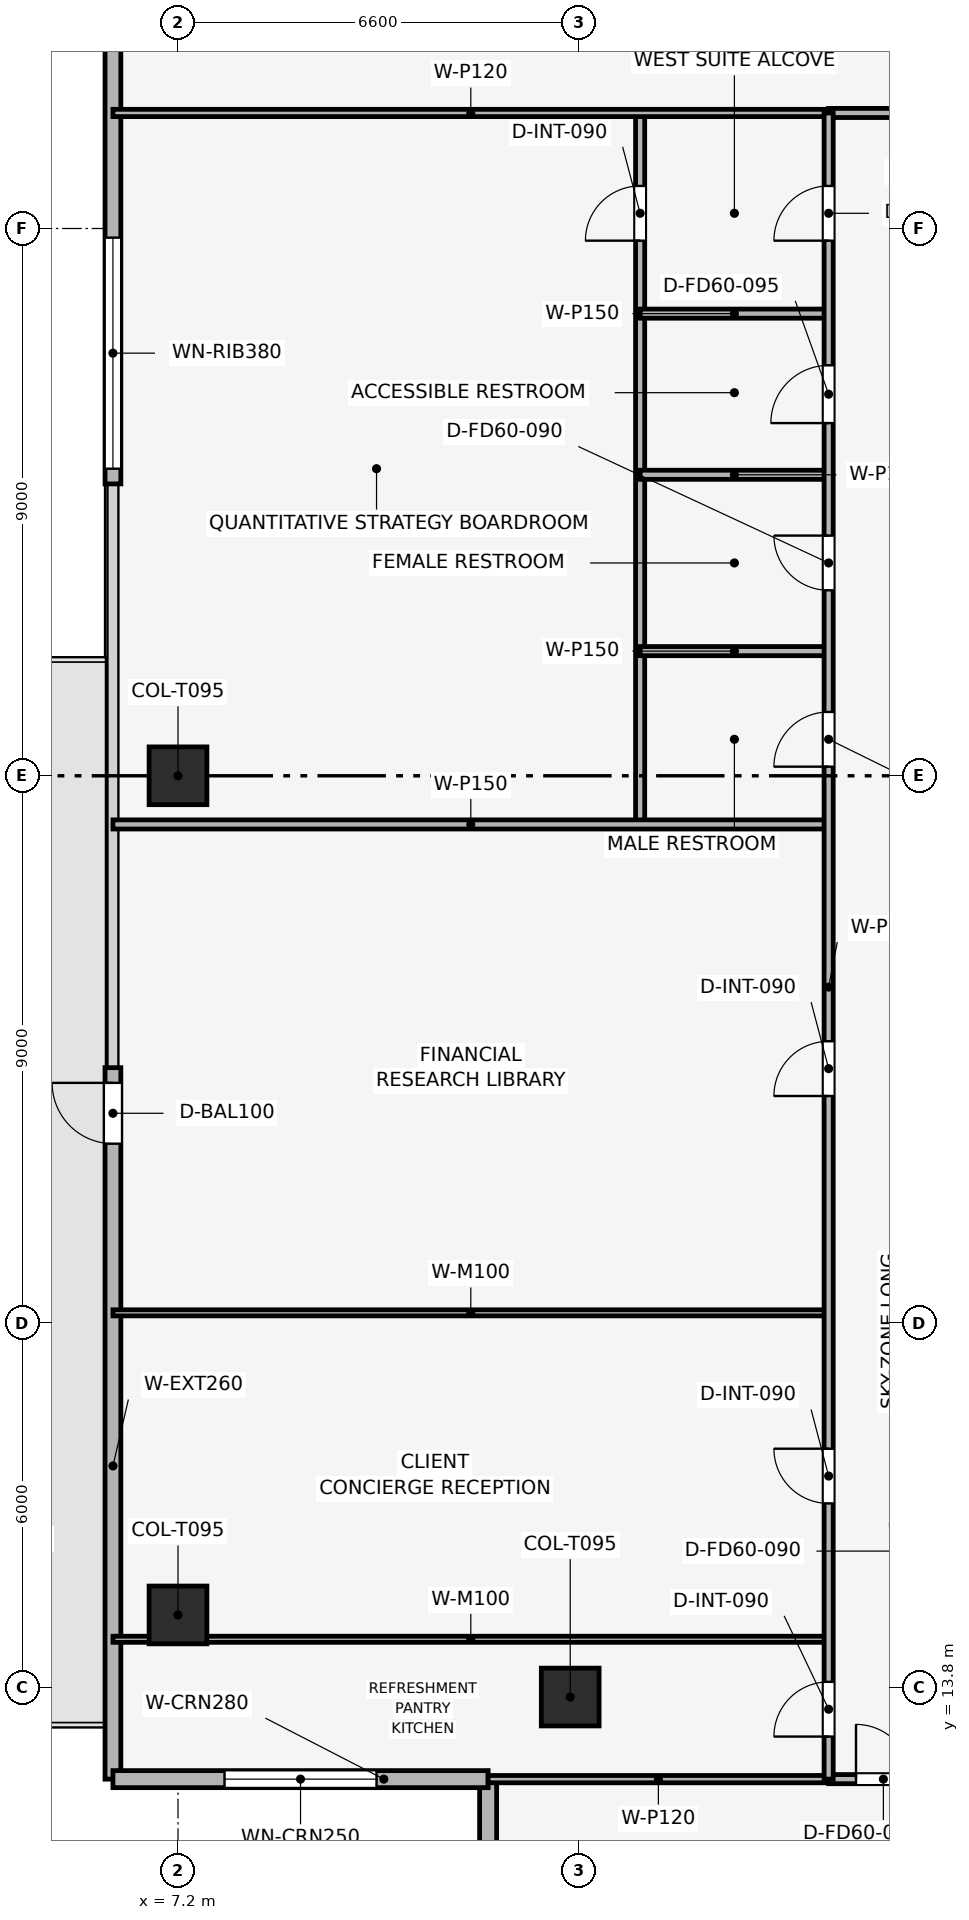
"""IFC4 building model, lengths in metres.
Left out: names, types, materials, properties, quantities, classifications, styles, units other than length and angle.
Written with IfcOpenShell. Run it as: python <this file> out.ifc"""

import sys

from ifc_helpers import new_model, si_unit, direction, frame, frame_2d, origin, origin_2d, place, context, subcontext, project, spatial, rectangle, extrude, element, fill, save


model = new_model("IFC4")
c1 = context("Model", 3, precision=1e-05, world=origin(), true_north=direction((0.0, 1.0)))
c2 = subcontext(c1, "Body", "Model", "MODEL_VIEW")
j1 = project(units=[si_unit("LENGTHUNIT", "METRE"), si_unit("PLANEANGLEUNIT", "RADIAN")], contexts=[c1])
p1 = place(None, origin())
s1 = spatial("IfcSite", under=j1, at=p1, CompositionType="ELEMENT")
p2 = place(p1, origin())
s2 = spatial("IfcBuilding", under=s1, at=p2, CompositionType="ELEMENT")
p3 = place(p2, frame((0.0, 0.0, 321.75)))
s3 = spatial("IfcBuildingStorey", under=s2, at=p3, CompositionType="ELEMENT", Elevation=321.75)
for number, where, z_axis, x_axis in (
    (1, (7.2, 28.8, 0.003), (0.0, 0.0, 1.0), (1.0, 0.0, 0.0)),
    (2, (7.2, 15.0, 0.003), (0.0, 0.0, 1.0), (1.0, 0.0, 0.0)),
    (3, (13.65, 13.65, 0.003), (0.0, 0.0, 1.0), (1.0, 0.0, 0.0)),
):
    element("IfcColumn", number, at=place(p3, frame(where, z_axis=z_axis, x_axis=x_axis)), inside=s3, PredefinedType="COLUMN", context=c2, shape_type="SweptSolid", body=[
        extrude(rectangle(XDim=0.95, YDim=0.95, at=origin_2d()), origin(), (0.0, 0.0, 1.0), 3.504),
    ])
p4 = place(p3, frame((6.13, 12.3, 0.0), z_axis=(0.0, 0.0, 1.0), x_axis=(0.0, 1.0, 0.0)))
e4 = element("IfcWall", 4, at=p4, inside=s3, PredefinedType="SOLIDWALL", context=c2, shape_type="SweptSolid", body=[
    extrude(rectangle(XDim=11.7, YDim=0.26, at=frame_2d((5.85, 0.0))), origin(), (0.0, 0.0, 1.0), 3.51),
])
p5 = place(p4, frame((10.45, 0.0, 0.0)))
e5 = element("IfcOpeningElement", 5, at=p5, cuts=e4, PredefinedType="OPENING", context=c2, shape_type="SweptSolid", body=[
    extrude(rectangle(XDim=1.0, YDim=2.2, at=frame_2d((0.5, 1.1))), frame((0.0, 0.14, 0.0), z_axis=(0.0, -1.0, 0.0), x_axis=(1.0, 0.0, 0.0)), (0.0, 0.0, 1.0), 0.28),
])
p6 = place(p3, frame((6.13, 33.6, 0.0), z_axis=(0.0, 0.0, 1.0), x_axis=(0.0, 1.0, 0.0)))
e6 = element("IfcWall", 6, at=p6, inside=s3, PredefinedType="SOLIDWALL", context=c2, shape_type="SweptSolid", body=[
    extrude(rectangle(XDim=11.7, YDim=0.26, at=frame_2d((5.85, 0.0))), origin(), (0.0, 0.0, 1.0), 3.51),
])
p7 = place(p6, frame((0.25, 0.0, 0.9)))
e7 = element("IfcOpeningElement", 7, at=p7, cuts=e6, PredefinedType="OPENING", context=c2, shape_type="SweptSolid", body=[
    extrude(rectangle(XDim=3.8, YDim=1.9, at=frame_2d((1.9, 0.95))), frame((0.0, 0.14, 0.0), z_axis=(0.0, -1.0, 0.0), x_axis=(1.0, 0.0, 0.0)), (0.0, 0.0, 1.0), 0.28),
])
p8 = place(p3, frame((12.3, 6.13, 0.0), z_axis=(0.0, 0.0, 1.0), x_axis=(0.0, 1.0, 0.0)))
e8 = element("IfcWall", 8, at=p8, inside=s3, PredefinedType="SOLIDWALL", context=c2, shape_type="SweptSolid", body=[
    extrude(rectangle(XDim=6.17, YDim=0.28, at=frame_2d((3.085, 0.0))), origin(), (0.0, 0.0, 1.0), 3.51),
])
p9 = place(p8, frame((1.835, 0.0, 0.9)))
e9 = element("IfcOpeningElement", 9, at=p9, cuts=e8, PredefinedType="OPENING", context=c2, shape_type="SweptSolid", body=[
    extrude(rectangle(XDim=2.5, YDim=1.9, at=frame_2d((1.25, 0.95))), frame((0.0, 0.15, 0.0), z_axis=(0.0, -1.0, 0.0), x_axis=(1.0, 0.0, 0.0)), (0.0, 0.0, 1.0), 0.3),
])
p10 = place(p3, frame((12.3, 12.3, 0.0), z_axis=(0.0, 0.0, 1.0), x_axis=(-1.0, 0.0, 0.0)))
e10 = element("IfcWall", 10, at=p10, inside=s3, PredefinedType="SOLIDWALL", context=c2, shape_type="SweptSolid", body=[
    extrude(rectangle(XDim=6.17, YDim=0.28, at=frame_2d((3.085, 0.0))), origin(), (0.0, 0.0, 1.0), 3.51),
])
p11 = place(p10, frame((1.835, 0.0, 0.9)))
e11 = element("IfcOpeningElement", 11, at=p11, cuts=e10, PredefinedType="OPENING", context=c2, shape_type="SweptSolid", body=[
    extrude(rectangle(XDim=2.5, YDim=1.9, at=frame_2d((1.25, 0.95))), frame((0.0, 0.15, 0.0), z_axis=(0.0, -1.0, 0.0), x_axis=(1.0, 0.0, 0.0)), (0.0, 0.0, 1.0), 0.3),
])
p12 = place(p3, frame((14.8, 28.0, 0.0), z_axis=(0.0, 0.0, 1.0), x_axis=(0.0, 1.0, 0.0)))
e12 = element("IfcWall", 12, at=p12, inside=s3, PredefinedType="PARTITIONING", context=c2, shape_type="SweptSolid", body=[
    extrude(rectangle(XDim=11.7, YDim=0.15, at=frame_2d((5.85, 0.0))), origin(), (0.0, 0.0, 1.0), 3.095),
])
p13 = place(p12, frame((9.6, 0.0, 0.0)))
e13 = element("IfcOpeningElement", 13, at=p13, cuts=e12, PredefinedType="OPENING", context=c2, shape_type="SweptSolid", body=[
    extrude(rectangle(XDim=0.9, YDim=2.1, at=frame_2d((0.45, 1.05))), frame((0.0, 0.085, 0.0), z_axis=(0.0, -1.0, 0.0), x_axis=(1.0, 0.0, 0.0)), (0.0, 0.0, 1.0), 0.17),
])
p14 = place(p3, frame((6.13, 28.0, 0.0), z_axis=(0.0, 0.0, 1.0), x_axis=(1.0, 0.0, 0.0)))
e14 = element("IfcWall", 14, at=p14, inside=s3, PredefinedType="PARTITIONING", context=c2, shape_type="SweptSolid", body=[
    extrude(rectangle(XDim=11.77, YDim=0.15, at=frame_2d((5.885, 0.0))), origin(), (0.0, 0.0, 1.0), 3.135),
])
for number, where, z_axis, x_axis in (
    (15, (14.8, 36.4, 0.0), (0.0, 0.0, 1.0), (1.0, 0.0, 0.0)),
    (16, (14.8, 30.85, 0.0), (0.0, 0.0, 1.0), (1.0, 0.0, 0.0)),
    (17, (14.8, 33.75, 0.0), (0.0, 0.0, 1.0), (1.0, 0.0, 0.0)),
):
    element("IfcWall", number, at=place(p3, frame(where, z_axis=z_axis, x_axis=x_axis)), inside=s3, PredefinedType="PARTITIONING", context=c2, shape_type="SweptSolid", body=[
        extrude(rectangle(XDim=3.1, YDim=0.15, at=frame_2d((1.55, 0.0))), origin(), (0.0, 0.0, 1.0), 3.135),
    ])
p15 = place(p3, frame((6.13, 14.6, 0.0), z_axis=(0.0, 0.0, 1.0), x_axis=(1.0, 0.0, 0.0)))
e18 = element("IfcWall", 18, at=p15, inside=s3, PredefinedType="MOVABLE", context=c2, shape_type="SweptSolid", body=[
    extrude(rectangle(XDim=11.77, YDim=0.1, at=frame_2d((5.885, 0.0))), origin(), (0.0, 0.0, 1.0), 3.095),
])
p16 = place(p3, frame((6.13, 19.968, 0.0), z_axis=(0.0, 0.0, 1.0), x_axis=(1.0, 0.0, 0.0)))
e19 = element("IfcWall", 19, at=p16, inside=s3, PredefinedType="MOVABLE", context=c2, shape_type="SweptSolid", body=[
    extrude(rectangle(XDim=11.77, YDim=0.1, at=frame_2d((5.885, 0.0))), origin(), (0.0, 0.0, 1.0), 3.195),
])
p17 = place(p3, frame((12.3, 12.3, 0.0), z_axis=(0.0, 0.0, 1.0), x_axis=(1.0, 0.0, 0.0)))
e20 = element("IfcWall", 20, at=p17, inside=s3, PredefinedType="PARTITIONING", context=c2, shape_type="SweptSolid", body=[
    extrude(rectangle(XDim=5.6, YDim=0.12, at=frame_2d((2.8, 0.0))), origin(), (0.0, 0.0, 1.0), 3.195),
])
p18 = place(p3, frame((17.9, 12.3, 0.0), z_axis=(0.0, 0.0, 1.0), x_axis=(1.0, 0.0, 0.0)))
e21 = element("IfcWall", 21, at=p18, inside=s3, PredefinedType="PARTITIONING", context=c2, shape_type="SweptSolid", body=[
    extrude(rectangle(XDim=1.9, YDim=0.15, at=frame_2d((0.95, 0.0))), origin(), (0.0, 0.0, 1.0), 3.51),
])
p19 = place(p18, frame((0.45, 0.0, 0.0)))
e22 = element("IfcOpeningElement", 22, at=p19, cuts=e21, PredefinedType="OPENING", context=c2, shape_type="SweptSolid", body=[
    extrude(rectangle(XDim=0.9, YDim=2.1, at=frame_2d((0.45, 1.05))), frame((0.0, 0.085, 0.0), z_axis=(0.0, -1.0, 0.0), x_axis=(1.0, 0.0, 0.0)), (0.0, 0.0, 1.0), 0.17),
])
p20 = place(p3, frame((6.13, 39.7, 0.0), z_axis=(0.0, 0.0, 1.0), x_axis=(1.0, 0.0, 0.0)))
e23 = element("IfcWall", 23, at=p20, inside=s3, PredefinedType="PARTITIONING", context=c2, shape_type="SweptSolid", body=[
    extrude(rectangle(XDim=11.77, YDim=0.12, at=frame_2d((5.885, 0.0))), origin(), (0.0, 0.0, 1.0), 3.095),
])
p21 = place(p3, frame((17.9, 39.7, 0.0), z_axis=(0.0, 0.0, 1.0), x_axis=(1.0, 0.0, 0.0)))
e24 = element("IfcWall", 24, at=p21, inside=s3, PredefinedType="PARTITIONING", context=c2, shape_type="SweptSolid", body=[
    extrude(rectangle(XDim=21.8, YDim=0.15, at=frame_2d((10.9, 0.0))), origin(), (0.0, 0.0, 1.0), 3.095),
])
p22 = place(p21, frame((1.302, 0.0, 0.0)))
e25 = element("IfcOpeningElement", 25, at=p22, cuts=e24, PredefinedType="OPENING", context=c2, shape_type="SweptSolid", body=[
    extrude(rectangle(XDim=0.9, YDim=2.1, at=frame_2d((0.45, 1.05))), frame((0.0, 0.085, 0.0), z_axis=(0.0, -1.0, 0.0), x_axis=(1.0, 0.0, 0.0)), (0.0, 0.0, 1.0), 0.17),
])
p23 = place(p21, frame((12.202, 0.0, 0.0)))
e26 = element("IfcOpeningElement", 26, at=p23, cuts=e24, PredefinedType="OPENING", context=c2, shape_type="SweptSolid", body=[
    extrude(rectangle(XDim=0.9, YDim=2.1, at=frame_2d((0.45, 1.05))), frame((0.0, 0.085, 0.0), z_axis=(0.0, -1.0, 0.0), x_axis=(1.0, 0.0, 0.0)), (0.0, 0.0, 1.0), 0.17),
])
p24 = place(p3, frame((17.9, 12.3, 0.0), z_axis=(0.0, 0.0, 1.0), x_axis=(0.0, 1.0, 0.0)))
e27 = element("IfcWall", 27, at=p24, inside=s3, PredefinedType="PARTITIONING", context=c2, shape_type="SweptSolid", body=[
    extrude(rectangle(XDim=27.4, YDim=0.15, at=frame_2d((13.7, 0.0))), origin(), (0.0, 0.0, 1.0), 3.095),
])
p25 = place(p24, frame((0.7, 0.0, 0.0)))
e28 = element("IfcOpeningElement", 28, at=p25, cuts=e27, PredefinedType="OPENING", context=c2, shape_type="SweptSolid", body=[
    extrude(rectangle(XDim=0.9, YDim=2.1, at=frame_2d((0.45, 1.05))), frame((0.0, 0.085, 0.0), z_axis=(0.0, -1.0, 0.0), x_axis=(1.0, 0.0, 0.0)), (0.0, 0.0, 1.0), 0.17),
])
p26 = place(p24, frame((4.534, 0.0, 0.0)))
e29 = element("IfcOpeningElement", 29, at=p26, cuts=e27, PredefinedType="OPENING", context=c2, shape_type="SweptSolid", body=[
    extrude(rectangle(XDim=0.9, YDim=2.1, at=frame_2d((0.45, 1.05))), frame((0.0, 0.085, 0.0), z_axis=(0.0, -1.0, 0.0), x_axis=(1.0, 0.0, 0.0)), (0.0, 0.0, 1.0), 0.17),
])
p27 = place(p24, frame((11.234, 0.0, 0.0)))
e30 = element("IfcOpeningElement", 30, at=p27, cuts=e27, PredefinedType="OPENING", context=c2, shape_type="SweptSolid", body=[
    extrude(rectangle(XDim=0.9, YDim=2.1, at=frame_2d((0.45, 1.05))), frame((0.0, 0.085, 0.0), z_axis=(0.0, -1.0, 0.0), x_axis=(1.0, 0.0, 0.0)), (0.0, 0.0, 1.0), 0.17),
])
p28 = place(p24, frame((16.65, 0.0, 0.0)))
e31 = element("IfcOpeningElement", 31, at=p28, cuts=e27, PredefinedType="OPENING", context=c2, shape_type="SweptSolid", body=[
    extrude(rectangle(XDim=0.9, YDim=2.1, at=frame_2d((0.45, 1.05))), frame((0.0, 0.085, 0.0), z_axis=(0.0, -1.0, 0.0), x_axis=(1.0, 0.0, 0.0)), (0.0, 0.0, 1.0), 0.17),
])
p29 = place(p24, frame((19.55, 0.0, 0.0)))
e32 = element("IfcOpeningElement", 32, at=p29, cuts=e27, PredefinedType="OPENING", context=c2, shape_type="SweptSolid", body=[
    extrude(rectangle(XDim=0.9, YDim=2.1, at=frame_2d((0.45, 1.05))), frame((0.0, 0.085, 0.0), z_axis=(0.0, -1.0, 0.0), x_axis=(1.0, 0.0, 0.0)), (0.0, 0.0, 1.0), 0.17),
])
p30 = place(p24, frame((22.3, 0.0, 0.0)))
e33 = element("IfcOpeningElement", 33, at=p30, cuts=e27, PredefinedType="OPENING", context=c2, shape_type="SweptSolid", body=[
    extrude(rectangle(XDim=0.95, YDim=2.1, at=frame_2d((0.475, 1.05))), frame((0.0, 0.085, 0.0), z_axis=(0.0, -1.0, 0.0), x_axis=(1.0, 0.0, 0.0)), (0.0, 0.0, 1.0), 0.17),
])
p31 = place(p24, frame((25.3, 0.0, 0.0)))
e34 = element("IfcOpeningElement", 34, at=p31, cuts=e27, PredefinedType="OPENING", context=c2, shape_type="SweptSolid", body=[
    extrude(rectangle(XDim=0.9, YDim=2.1, at=frame_2d((0.45, 1.05))), frame((0.0, 0.085, 0.0), z_axis=(0.0, -1.0, 0.0), x_axis=(1.0, 0.0, 0.0)), (0.0, 0.0, 1.0), 0.17),
])
p32 = place(p5, origin())
e35 = element("IfcDoor", 35, at=p32, inside=s3, OperationType="SINGLE_SWING_RIGHT", PredefinedType="DOOR", context=c2, shape_type="SweptSolid", body=[
    extrude(rectangle(XDim=1.0, YDim=2.2, at=frame_2d((0.5, 1.1))), frame((0.0, 0.025, 0.0), z_axis=(0.0, -1.0, 0.0), x_axis=(1.0, 0.0, 0.0)), (0.0, 0.0, 1.0), 0.05),
])
fill(e5, e35)
p33 = place(p7, origin())
e36 = element("IfcWindow", 36, at=p33, inside=s3, PartitioningType="SINGLE_PANEL", PredefinedType="WINDOW", context=c2, shape_type="SweptSolid", body=[
    extrude(rectangle(XDim=3.8, YDim=1.9, at=frame_2d((1.9, 0.95))), frame((0.0, 0.03, 0.0), z_axis=(0.0, -1.0, 0.0), x_axis=(1.0, 0.0, 0.0)), (0.0, 0.0, 1.0), 0.06),
])
fill(e7, e36)
p34 = place(p11, origin())
e37 = element("IfcWindow", 37, at=p34, inside=s3, PartitioningType="SINGLE_PANEL", PredefinedType="WINDOW", context=c2, shape_type="SweptSolid", body=[
    extrude(rectangle(XDim=2.5, YDim=1.9, at=frame_2d((1.25, 0.95))), frame((0.0, 0.03, 0.0), z_axis=(0.0, -1.0, 0.0), x_axis=(1.0, 0.0, 0.0)), (0.0, 0.0, 1.0), 0.06),
])
fill(e11, e37)
p35 = place(p13, origin())
e38 = element("IfcDoor", 38, at=p35, inside=s3, OperationType="SINGLE_SWING_LEFT", PredefinedType="DOOR", context=c2, shape_type="SweptSolid", body=[
    extrude(rectangle(XDim=0.9, YDim=2.1, at=frame_2d((0.45, 1.05))), frame((0.0, 0.025, 0.0), z_axis=(0.0, -1.0, 0.0), x_axis=(1.0, 0.0, 0.0)), (0.0, 0.0, 1.0), 0.05),
])
fill(e13, e38)
p36 = place(p19, origin())
e39 = element("IfcDoor", 39, at=p36, inside=s3, OperationType="SINGLE_SWING_LEFT", PredefinedType="DOOR", context=c2, shape_type="SweptSolid", body=[
    extrude(rectangle(XDim=0.9, YDim=2.1, at=frame_2d((0.45, 1.05))), frame((0.0, 0.025, 0.0), z_axis=(0.0, -1.0, 0.0), x_axis=(1.0, 0.0, 0.0)), (0.0, 0.0, 1.0), 0.05),
])
fill(e22, e39)
p37 = place(p25, origin())
e40 = element("IfcDoor", 40, at=p37, inside=s3, OperationType="SINGLE_SWING_LEFT", PredefinedType="DOOR", context=c2, shape_type="SweptSolid", body=[
    extrude(rectangle(XDim=0.9, YDim=2.1, at=frame_2d((0.45, 1.05))), frame((0.0, 0.025, 0.0), z_axis=(0.0, -1.0, 0.0), x_axis=(1.0, 0.0, 0.0)), (0.0, 0.0, 1.0), 0.05),
])
fill(e28, e40)
p38 = place(p26, origin())
e41 = element("IfcDoor", 41, at=p38, inside=s3, OperationType="SINGLE_SWING_RIGHT", PredefinedType="DOOR", context=c2, shape_type="SweptSolid", body=[
    extrude(rectangle(XDim=0.9, YDim=2.1, at=frame_2d((0.45, 1.05))), frame((0.0, 0.025, 0.0), z_axis=(0.0, -1.0, 0.0), x_axis=(1.0, 0.0, 0.0)), (0.0, 0.0, 1.0), 0.05),
])
fill(e29, e41)
p39 = place(p27, origin())
e42 = element("IfcDoor", 42, at=p39, inside=s3, OperationType="SINGLE_SWING_LEFT", PredefinedType="DOOR", context=c2, shape_type="SweptSolid", body=[
    extrude(rectangle(XDim=0.9, YDim=2.1, at=frame_2d((0.45, 1.05))), frame((0.0, 0.025, 0.0), z_axis=(0.0, -1.0, 0.0), x_axis=(1.0, 0.0, 0.0)), (0.0, 0.0, 1.0), 0.05),
])
fill(e30, e42)
p40 = place(p28, origin())
e43 = element("IfcDoor", 43, at=p40, inside=s3, OperationType="SINGLE_SWING_LEFT", PredefinedType="DOOR", context=c2, shape_type="SweptSolid", body=[
    extrude(rectangle(XDim=0.9, YDim=2.1, at=frame_2d((0.45, 1.05))), frame((0.0, 0.025, 0.0), z_axis=(0.0, -1.0, 0.0), x_axis=(1.0, 0.0, 0.0)), (0.0, 0.0, 1.0), 0.05),
])
fill(e31, e43)
p41 = place(p29, origin())
e44 = element("IfcDoor", 44, at=p41, inside=s3, OperationType="SINGLE_SWING_RIGHT", PredefinedType="DOOR", context=c2, shape_type="SweptSolid", body=[
    extrude(rectangle(XDim=0.9, YDim=2.1, at=frame_2d((0.45, 1.05))), frame((0.0, 0.025, 0.0), z_axis=(0.0, -1.0, 0.0), x_axis=(1.0, 0.0, 0.0)), (0.0, 0.0, 1.0), 0.05),
])
fill(e32, e44)
p42 = place(p30, origin())
e45 = element("IfcDoor", 45, at=p42, inside=s3, OperationType="SINGLE_SWING_LEFT", PredefinedType="DOOR", context=c2, shape_type="SweptSolid", body=[
    extrude(rectangle(XDim=0.95, YDim=2.1, at=frame_2d((0.475, 1.05))), frame((0.0, 0.025, 0.0), z_axis=(0.0, -1.0, 0.0), x_axis=(1.0, 0.0, 0.0)), (0.0, 0.0, 1.0), 0.05),
])
fill(e33, e45)
p43 = place(p31, origin())
e46 = element("IfcDoor", 46, at=p43, inside=s3, OperationType="SINGLE_SWING_LEFT", PredefinedType="DOOR", context=c2, shape_type="SweptSolid", body=[
    extrude(rectangle(XDim=0.9, YDim=2.1, at=frame_2d((0.45, 1.05))), frame((0.0, 0.025, 0.0), z_axis=(0.0, -1.0, 0.0), x_axis=(1.0, 0.0, 0.0)), (0.0, 0.0, 1.0), 0.05),
])
fill(e34, e46)
save(model, sys.argv[1])
